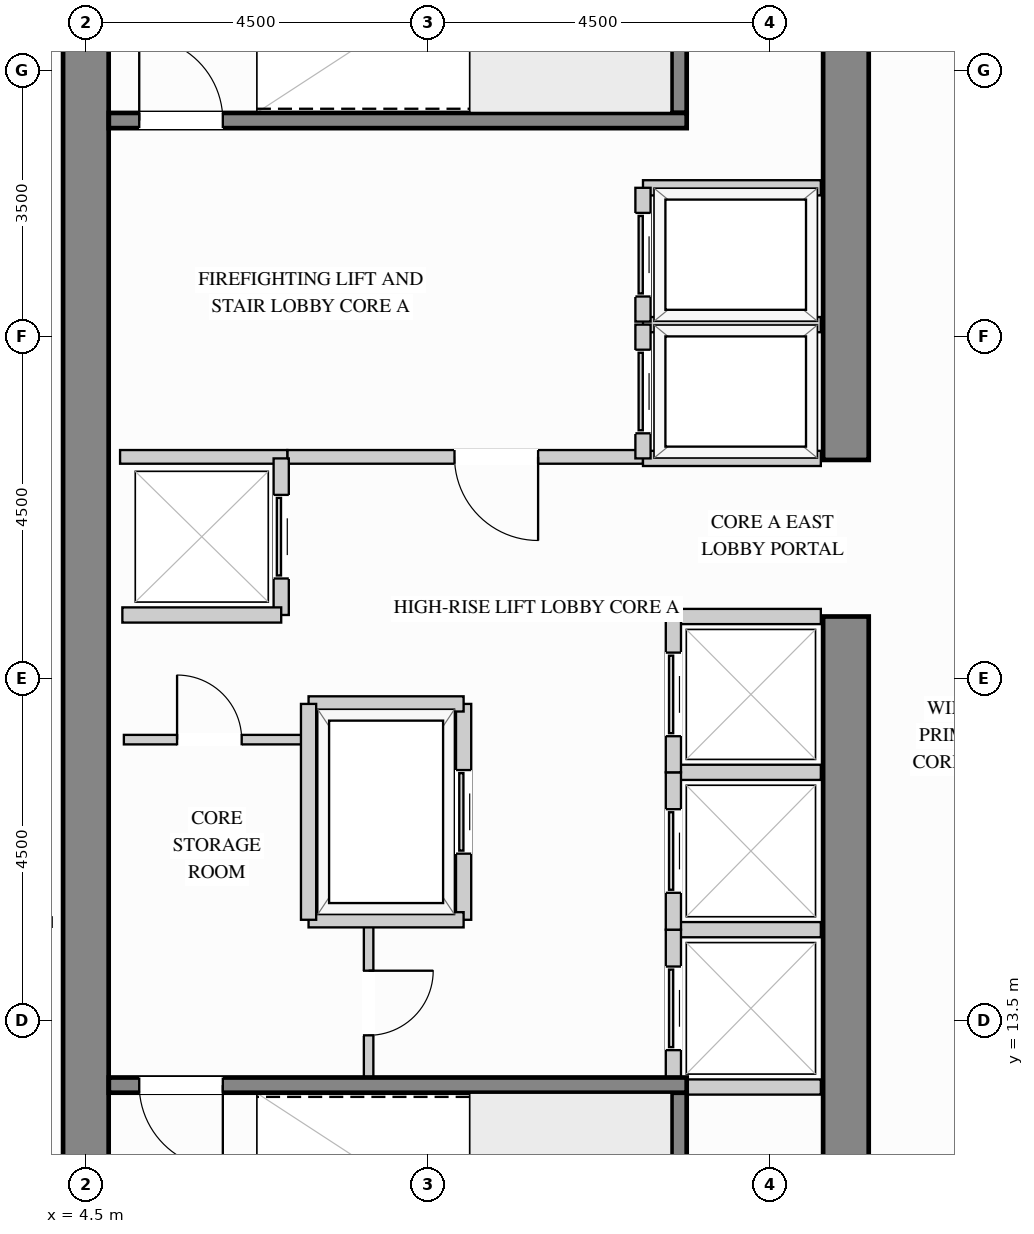
"""IFC4 building model, lengths in metres.
Left out: names, types, materials, properties, quantities, classifications, styles, units other than length and angle.
Written with IfcOpenShell. Run it as: python <this file> out.ifc"""

import sys

from ifc_helpers import new_model, si_unit, direction, frame, frame_2d, origin, place, context, subcontext, project, spatial, rectangle, extrude, source, transform, mapped, element, fill, save


model = new_model("IFC4")
c1 = context("Model", 3, precision=1e-05, world=origin(), true_north=direction((0.0, 1.0)))
c2 = subcontext(c1, "Body", "Model", "MODEL_VIEW")
j1 = project(units=[si_unit("LENGTHUNIT", "METRE"), si_unit("PLANEANGLEUNIT", "RADIAN")], contexts=[c1])
p1 = place(None, origin())
s1 = spatial("IfcSite", under=j1, at=p1, CompositionType="ELEMENT")
p2 = place(p1, origin())
s2 = spatial("IfcBuilding", under=s1, at=p2, CompositionType="ELEMENT")
p3 = place(p2, frame((0.0, 0.0, 150.3)))
s3 = spatial("IfcBuildingStorey", under=s2, at=p3, CompositionType="ELEMENT", Elevation=150.3)
m1 = source(origin(), c2, "Body", "SweptSolid", [
    extrude(rectangle(XDim=10.02, YDim=0.6, at=frame_2d((5.01, 0.0))), origin(), (0.0, 0.0, 1.0), 3.4),
])
p4 = place(p3, frame((14.5, 8.8, 0.0), z_axis=(0.0, 0.0, 1.0), x_axis=(0.0, 1.0, 0.0)))
e1 = element("IfcWall", 1, at=p4, inside=s3, PredefinedType="SHEAR", context=c2, shape_type="MappedRepresentation", body=[
    mapped(m1, transform((0.0, 0.0, 0.0), x_axis=(1.0, 0.0, 0.0), y_axis=(0.0, 1.0, 0.0), z_axis=(0.0, 0.0, 1.0))),
])
m2 = source(origin(), c2, "Body", "SweptSolid", [
    extrude(rectangle(XDim=8.32, YDim=0.6, at=frame_2d((4.16, 0.0))), origin(), (0.0, 0.0, 1.0), 3.4),
])
p5 = place(p3, frame((14.5, 20.88, 0.0), z_axis=(0.0, 0.0, 1.0), x_axis=(0.0, 1.0, 0.0)))
e2 = element("IfcWall", 2, at=p5, inside=s3, PredefinedType="SHEAR", context=c2, shape_type="MappedRepresentation", body=[
    mapped(m2, transform((0.0, 0.0, 0.0), x_axis=(1.0, 0.0, 0.0), y_axis=(0.0, 1.0, 0.0), z_axis=(0.0, 0.0, 1.0))),
])
m3 = source(origin(), c2, "Body", "SweptSolid", [
    extrude(rectangle(XDim=20.4, YDim=0.6, at=frame_2d((10.2, 0.0))), origin(), (0.0, 0.0, 1.0), 3.4),
])
p6 = place(p3, frame((4.5, 8.8, 0.0), z_axis=(0.0, 0.0, 1.0), x_axis=(0.0, 1.0, 0.0)))
e3 = element("IfcWall", 3, at=p6, inside=s3, PredefinedType="SHEAR", context=c2, shape_type="MappedRepresentation", body=[
    mapped(m3, transform((0.0, 0.0, 0.0), x_axis=(1.0, 0.0, 0.0), y_axis=(0.0, 1.0, 0.0), z_axis=(0.0, 0.0, 1.0))),
])
p7 = place(p3, frame((7.15, 20.92, 0.0), z_axis=(0.0, 0.0, 1.0), x_axis=(1.0, 0.0, 0.0)))
e4 = element("IfcWall", 4, at=p7, inside=s3, PredefinedType="PARTITIONING", context=c2, shape_type="SweptSolid", body=[
    extrude(rectangle(XDim=4.68, YDim=0.18, at=frame_2d((2.34, 0.0))), origin(), (0.0, 0.0, 1.0), 3.385),
])
p8 = place(p7, frame((2.2, 0.0, 0.0)))
e5 = element("IfcOpeningElement", 5, at=p8, cuts=e4, PredefinedType="OPENING", context=c2, shape_type="SweptSolid", body=[
    extrude(rectangle(XDim=1.1, YDim=2.15, at=frame_2d((0.55, 1.075))), frame((0.0, 0.1, 0.0), z_axis=(0.0, -1.0, 0.0), x_axis=(1.0, 0.0, 0.0)), (0.0, 0.0, 1.0), 0.2),
])
m4 = source(origin(), c2, "Body", "SweptSolid", [
    extrude(rectangle(XDim=2.2, YDim=0.18, at=frame_2d((1.1, 0.0))), origin(), (0.0, 0.0, 1.0), 3.385),
])
p9 = place(p3, frame((4.95, 20.92, 0.0), z_axis=(0.0, 0.0, 1.0), x_axis=(1.0, 0.0, 0.0)))
e6 = element("IfcWall", 6, at=p9, inside=s3, PredefinedType="PARTITIONING", context=c2, shape_type="MappedRepresentation", body=[
    mapped(m4, transform((0.0, 0.0, 0.0), x_axis=(1.0, 0.0, 0.0), y_axis=(0.0, 1.0, 0.0), z_axis=(0.0, 0.0, 1.0))),
])
p10 = place(p3, frame((8.22, 12.75, 0.0), z_axis=(0.0, 0.0, 1.0), x_axis=(0.0, 1.0, 0.0)))
e7 = element("IfcWall", 7, at=p10, inside=s3, PredefinedType="PARTITIONING", context=c2, shape_type="SweptSolid", body=[
    extrude(rectangle(XDim=2.07, YDim=0.125, at=frame_2d((1.035, 0.0))), origin(), (0.0, 0.0, 1.0), 3.385),
])
p11 = place(p10, frame((0.56, 0.0, 0.0)))
e8 = element("IfcOpeningElement", 8, at=p11, cuts=e7, PredefinedType="OPENING", context=c2, shape_type="SweptSolid", body=[
    extrude(rectangle(XDim=0.85, YDim=2.1, at=frame_2d((0.425, 1.05))), frame((0.0, 0.073, 0.0), z_axis=(0.0, -1.0, 0.0), x_axis=(1.0, 0.0, 0.0)), (0.0, 0.0, 1.0), 0.145),
])
p12 = place(p3, frame((5.0, 17.2, 0.0), z_axis=(0.0, 0.0, 1.0), x_axis=(1.0, 0.0, 0.0)))
e9 = element("IfcWall", 9, at=p12, inside=s3, PredefinedType="PARTITIONING", context=c2, shape_type="SweptSolid", body=[
    extrude(rectangle(XDim=2.4, YDim=0.125, at=frame_2d((1.2, 0.0))), origin(), (0.0, 0.0, 1.0), 3.385),
])
p13 = place(p12, frame((0.7, 0.0, 0.0)))
e10 = element("IfcOpeningElement", 10, at=p13, cuts=e9, PredefinedType="OPENING", context=c2, shape_type="SweptSolid", body=[
    extrude(rectangle(XDim=0.85, YDim=2.1, at=frame_2d((0.425, 1.05))), frame((0.0, 0.073, 0.0), z_axis=(0.0, -1.0, 0.0), x_axis=(1.0, 0.0, 0.0)), (0.0, 0.0, 1.0), 0.145),
])
m5 = source(origin(), c2, "Body", "SweptSolid", [
    extrude(rectangle(XDim=3.698, YDim=0.125, at=frame_2d((1.849, 0.0))), origin(), (0.0, 0.0, 1.0), 3.385),
])
p14 = place(p3, frame((0.352, 14.8, 0.0), z_axis=(0.0, 0.0, 1.0), x_axis=(1.0, 0.0, 0.0)))
e11 = element("IfcWall", 11, at=p14, inside=s3, PredefinedType="PARTITIONING", context=c2, shape_type="MappedRepresentation", body=[
    mapped(m5, transform((0.0, 0.0, 0.0), x_axis=(1.0, 0.0, 0.0), y_axis=(0.0, 1.0, 0.0), z_axis=(0.0, 0.0, 1.0))),
])
m6 = source(origin(), c2, "Body", "SweptSolid", [
    extrude(rectangle(XDim=2.34, YDim=0.2, at=frame_2d((1.17, 0.0))), origin(), (0.0, 0.0, 1.0), 3.385),
])
for number, where, z_axis, x_axis in (
    (12, (11.83, 22.66, 0.0), (0.0, 0.0, 1.0), (1.0, 0.0, 0.0)),
    (13, (11.83, 20.9, 0.0), (0.0, 0.0, 1.0), (1.0, 0.0, 0.0)),
):
    element("IfcWall", number, at=place(p3, frame(where, z_axis=z_axis, x_axis=x_axis)), inside=s3, PredefinedType="PARTITIONING", context=c2, shape_type="MappedRepresentation", body=[
        mapped(m6, transform((0.0, 0.0, 0.0), x_axis=(1.0, 0.0, 0.0), y_axis=(0.0, 1.0, 0.0), z_axis=(0.0, 0.0, 1.0))),
    ])
p15 = place(p3, frame((11.83, 20.9, 0.0), z_axis=(0.0, 0.0, 1.0), x_axis=(0.0, 1.0, 0.0)))
e14 = element("IfcWall", 14, at=p15, inside=s3, PredefinedType="PARTITIONING", context=c2, shape_type="SweptSolid", body=[
    extrude(rectangle(XDim=1.76, YDim=0.2, at=frame_2d((0.88, 0.0))), origin(), (0.0, 0.0, 1.0), 3.385),
])
p16 = place(p15, frame((0.33, 0.0, 0.0)))
e15 = element("IfcOpeningElement", 15, at=p16, cuts=e14, PredefinedType="OPENING", context=c2, shape_type="SweptSolid", body=[
    extrude(rectangle(XDim=1.1, YDim=2.2, at=frame_2d((0.55, 1.1))), frame((0.0, 0.11, 0.0), z_axis=(0.0, -1.0, 0.0), x_axis=(1.0, 0.0, 0.0)), (0.0, 0.0, 1.0), 0.22),
])
p17 = place(p3, frame((11.83, 24.46, 0.0), z_axis=(0.0, 0.0, 1.0), x_axis=(1.0, 0.0, 0.0)))
e16 = element("IfcWall", 16, at=p17, inside=s3, PredefinedType="PARTITIONING", context=c2, shape_type="MappedRepresentation", body=[
    mapped(m6, transform((0.0, 0.0, 0.0), x_axis=(1.0, 0.0, 0.0), y_axis=(0.0, 1.0, 0.0), z_axis=(0.0, 0.0, 1.0))),
])
p18 = place(p3, frame((11.83, 22.7, 0.0), z_axis=(0.0, 0.0, 1.0), x_axis=(0.0, 1.0, 0.0)))
e17 = element("IfcWall", 17, at=p18, inside=s3, PredefinedType="PARTITIONING", context=c2, shape_type="SweptSolid", body=[
    extrude(rectangle(XDim=1.76, YDim=0.2, at=frame_2d((0.88, 0.0))), origin(), (0.0, 0.0, 1.0), 3.385),
])
p19 = place(p18, frame((0.33, 0.0, 0.0)))
e18 = element("IfcOpeningElement", 18, at=p19, cuts=e17, PredefinedType="OPENING", context=c2, shape_type="SweptSolid", body=[
    extrude(rectangle(XDim=1.1, YDim=2.2, at=frame_2d((0.55, 1.1))), frame((0.0, 0.11, 0.0), z_axis=(0.0, -1.0, 0.0), x_axis=(1.0, 0.0, 0.0)), (0.0, 0.0, 1.0), 0.22),
])
m7 = source(origin(), c2, "Body", "SweptSolid", [
    extrude(rectangle(XDim=1.94, YDim=0.2, at=frame_2d((0.97, 0.0))), origin(), (0.0, 0.0, 1.0), 3.385),
])
for number, where, z_axis, x_axis in (
    (19, (12.23, 14.7, 0.0), (0.0, 0.0, 1.0), (1.0, 0.0, 0.0)),
    (20, (12.23, 12.63, 0.0), (0.0, 0.0, 1.0), (1.0, 0.0, 0.0)),
):
    element("IfcWall", number, at=place(p3, frame(where, z_axis=z_axis, x_axis=x_axis)), inside=s3, PredefinedType="PARTITIONING", context=c2, shape_type="MappedRepresentation", body=[
        mapped(m7, transform((0.0, 0.0, 0.0), x_axis=(1.0, 0.0, 0.0), y_axis=(0.0, 1.0, 0.0), z_axis=(0.0, 0.0, 1.0))),
    ])
p20 = place(p3, frame((12.23, 12.63, 0.0), z_axis=(0.0, 0.0, 1.0), x_axis=(0.0, 1.0, 0.0)))
e21 = element("IfcWall", 21, at=p20, inside=s3, PredefinedType="PARTITIONING", context=c2, shape_type="SweptSolid", body=[
    extrude(rectangle(XDim=2.07, YDim=0.2, at=frame_2d((1.035, 0.0))), origin(), (0.0, 0.0, 1.0), 3.385),
])
p21 = place(p20, frame((0.485, 0.0, 0.0)))
e22 = element("IfcOpeningElement", 22, at=p21, cuts=e21, PredefinedType="OPENING", context=c2, shape_type="SweptSolid", body=[
    extrude(rectangle(XDim=1.1, YDim=2.2, at=frame_2d((0.55, 1.1))), frame((0.0, 0.11, 0.0), z_axis=(0.0, -1.0, 0.0), x_axis=(1.0, 0.0, 0.0)), (0.0, 0.0, 1.0), 0.22),
])
p22 = place(p3, frame((12.23, 16.77, 0.0), z_axis=(0.0, 0.0, 1.0), x_axis=(1.0, 0.0, 0.0)))
e23 = element("IfcWall", 23, at=p22, inside=s3, PredefinedType="PARTITIONING", context=c2, shape_type="MappedRepresentation", body=[
    mapped(m7, transform((0.0, 0.0, 0.0), x_axis=(1.0, 0.0, 0.0), y_axis=(0.0, 1.0, 0.0), z_axis=(0.0, 0.0, 1.0))),
])
p23 = place(p3, frame((12.23, 14.7, 0.0), z_axis=(0.0, 0.0, 1.0), x_axis=(0.0, 1.0, 0.0)))
e24 = element("IfcWall", 24, at=p23, inside=s3, PredefinedType="PARTITIONING", context=c2, shape_type="SweptSolid", body=[
    extrude(rectangle(XDim=2.07, YDim=0.2, at=frame_2d((1.035, 0.0))), origin(), (0.0, 0.0, 1.0), 3.385),
])
p24 = place(p23, frame((0.485, 0.0, 0.0)))
e25 = element("IfcOpeningElement", 25, at=p24, cuts=e24, PredefinedType="OPENING", context=c2, shape_type="SweptSolid", body=[
    extrude(rectangle(XDim=1.1, YDim=2.2, at=frame_2d((0.55, 1.1))), frame((0.0, 0.11, 0.0), z_axis=(0.0, -1.0, 0.0), x_axis=(1.0, 0.0, 0.0)), (0.0, 0.0, 1.0), 0.22),
])
p25 = place(p3, frame((12.23, 18.82, 0.0), z_axis=(0.0, 0.0, 1.0), x_axis=(1.0, 0.0, 0.0)))
e26 = element("IfcWall", 26, at=p25, inside=s3, PredefinedType="PARTITIONING", context=c2, shape_type="MappedRepresentation", body=[
    mapped(m7, transform((0.0, 0.0, 0.0), x_axis=(1.0, 0.0, 0.0), y_axis=(0.0, 1.0, 0.0), z_axis=(0.0, 0.0, 1.0))),
])
p26 = place(p3, frame((12.23, 16.77, 0.0), z_axis=(0.0, 0.0, 1.0), x_axis=(0.0, 1.0, 0.0)))
e27 = element("IfcWall", 27, at=p26, inside=s3, PredefinedType="PARTITIONING", context=c2, shape_type="SweptSolid", body=[
    extrude(rectangle(XDim=2.05, YDim=0.2, at=frame_2d((1.025, 0.0))), origin(), (0.0, 0.0, 1.0), 3.385),
])
p27 = place(p26, frame((0.475, 0.0, 0.0)))
e28 = element("IfcOpeningElement", 28, at=p27, cuts=e27, PredefinedType="OPENING", context=c2, shape_type="SweptSolid", body=[
    extrude(rectangle(XDim=1.1, YDim=2.2, at=frame_2d((0.55, 1.1))), frame((0.0, 0.11, 0.0), z_axis=(0.0, -1.0, 0.0), x_axis=(1.0, 0.0, 0.0)), (0.0, 0.0, 1.0), 0.22),
])
p28 = place(p3, frame((7.07, 18.84, 0.0), z_axis=(0.0, 0.0, 1.0), x_axis=(0.0, 1.0, 0.0)))
e29 = element("IfcWall", 29, at=p28, inside=s3, PredefinedType="PARTITIONING", context=c2, shape_type="SweptSolid", body=[
    extrude(rectangle(XDim=2.06, YDim=0.2, at=frame_2d((1.03, 0.0))), origin(), (0.0, 0.0, 1.0), 3.385),
])
p29 = place(p28, frame((0.48, 0.0, 0.0)))
e30 = element("IfcOpeningElement", 30, at=p29, cuts=e29, PredefinedType="OPENING", context=c2, shape_type="SweptSolid", body=[
    extrude(rectangle(XDim=1.1, YDim=2.2, at=frame_2d((0.55, 1.1))), frame((0.0, 0.11, 0.0), z_axis=(0.0, -1.0, 0.0), x_axis=(1.0, 0.0, 0.0)), (0.0, 0.0, 1.0), 0.22),
])
m8 = source(origin(), c2, "Body", "SweptSolid", [
    extrude(rectangle(XDim=2.09, YDim=0.2, at=frame_2d((1.045, 0.0))), origin(), (0.0, 0.0, 1.0), 3.385),
])
p30 = place(p3, frame((4.98, 18.84, 0.0), z_axis=(0.0, 0.0, 1.0), x_axis=(1.0, 0.0, 0.0)))
e31 = element("IfcWall", 31, at=p30, inside=s3, PredefinedType="PARTITIONING", context=c2, shape_type="MappedRepresentation", body=[
    mapped(m8, transform((0.0, 0.0, 0.0), x_axis=(1.0, 0.0, 0.0), y_axis=(0.0, 1.0, 0.0), z_axis=(0.0, 0.0, 1.0))),
])
p31 = place(p3, frame((9.47, 14.83, 0.0), z_axis=(0.0, 0.0, 1.0), x_axis=(0.0, 1.0, 0.0)))
e32 = element("IfcWall", 32, at=p31, inside=s3, PredefinedType="PARTITIONING", context=c2, shape_type="SweptSolid", body=[
    extrude(rectangle(XDim=2.84, YDim=0.2, at=frame_2d((1.42, 0.0))), origin(), (0.0, 0.0, 1.0), 3.385),
])
p32 = place(p31, frame((0.87, 0.0, 0.0)))
e33 = element("IfcOpeningElement", 33, at=p32, cuts=e32, PredefinedType="OPENING", context=c2, shape_type="SweptSolid", body=[
    extrude(rectangle(XDim=1.1, YDim=2.2, at=frame_2d((0.55, 1.1))), frame((0.0, 0.11, 0.0), z_axis=(0.0, -1.0, 0.0), x_axis=(1.0, 0.0, 0.0)), (0.0, 0.0, 1.0), 0.22),
])
m9 = source(origin(), c2, "Body", "SweptSolid", [
    extrude(rectangle(XDim=2.04, YDim=0.2, at=frame_2d((1.02, 0.0))), origin(), (0.0, 0.0, 1.0), 3.385),
])
for number, where, z_axis, x_axis in (
    (34, (7.43, 17.67, 0.0), (0.0, 0.0, 1.0), (1.0, 0.0, 0.0)),
    (35, (7.43, 14.83, 0.0), (0.0, 0.0, 1.0), (1.0, 0.0, 0.0)),
):
    element("IfcWall", number, at=place(p3, frame(where, z_axis=z_axis, x_axis=x_axis)), inside=s3, PredefinedType="PARTITIONING", context=c2, shape_type="MappedRepresentation", body=[
        mapped(m9, transform((0.0, 0.0, 0.0), x_axis=(1.0, 0.0, 0.0), y_axis=(0.0, 1.0, 0.0), z_axis=(0.0, 0.0, 1.0))),
    ])
m10 = source(origin(), c2, "Body", "SweptSolid", [
    extrude(rectangle(XDim=2.84, YDim=0.2, at=frame_2d((1.42, 0.0))), origin(), (0.0, 0.0, 1.0), 3.385),
])
p33 = place(p3, frame((7.43, 14.83, 0.0), z_axis=(0.0, 0.0, 1.0), x_axis=(0.0, 1.0, 0.0)))
e36 = element("IfcWall", 36, at=p33, inside=s3, PredefinedType="PARTITIONING", context=c2, shape_type="MappedRepresentation", body=[
    mapped(m10, transform((0.0, 0.0, 0.0), x_axis=(1.0, 0.0, 0.0), y_axis=(0.0, 1.0, 0.0), z_axis=(0.0, 0.0, 1.0))),
])
m11 = source(origin(), c2, "Body", "SweptSolid", [
    extrude(rectangle(XDim=3.753, YDim=0.2, at=frame_2d((1.876, 0.0))), origin(), (0.0, 0.0, 1.0), 3.4),
])
p34 = place(p3, frame((12.305, 8.802, 0.0), z_axis=(0.0, 0.0, 1.0), x_axis=(0.0, 1.0, 0.0)))
e37 = element("IfcWall", 37, at=p34, inside=s3, PredefinedType="SHEAR", context=c2, shape_type="MappedRepresentation", body=[
    mapped(m11, transform((0.0, 0.0, 0.0), x_axis=(1.0, 0.0, 0.0), y_axis=(0.0, 1.0, 0.0), z_axis=(0.0, 0.0, 1.0))),
])
p35 = place(p3, frame((4.802, 12.655, 0.0), z_axis=(0.0, 0.0, 1.0), x_axis=(1.0, 0.0, 0.0)))
e38 = element("IfcWall", 38, at=p35, inside=s3, PredefinedType="SHEAR", context=c2, shape_type="SweptSolid", body=[
    extrude(rectangle(XDim=7.603, YDim=0.2, at=frame_2d((3.802, 0.0))), origin(), (0.0, 0.0, 1.0), 3.4),
])
p36 = place(p35, frame((0.4, 0.0, 0.0)))
e39 = element("IfcOpeningElement", 39, at=p36, cuts=e38, PredefinedType="OPENING", context=c2, shape_type="SweptSolid", body=[
    extrude(rectangle(XDim=1.1, YDim=2.15, at=frame_2d((0.55, 1.075))), frame((0.0, 0.11, 0.0), z_axis=(0.0, -1.0, 0.0), x_axis=(1.0, 0.0, 0.0)), (0.0, 0.0, 1.0), 0.22),
])
p37 = place(p3, frame((12.305, 25.445, 0.0), z_axis=(0.0, 0.0, 1.0), x_axis=(0.0, 1.0, 0.0)))
e40 = element("IfcWall", 40, at=p37, inside=s3, PredefinedType="SHEAR", context=c2, shape_type="MappedRepresentation", body=[
    mapped(m11, transform((0.0, 0.0, 0.0), x_axis=(1.0, 0.0, 0.0), y_axis=(0.0, 1.0, 0.0), z_axis=(0.0, 0.0, 1.0))),
])
p38 = place(p3, frame((4.802, 25.345, 0.0), z_axis=(0.0, 0.0, 1.0), x_axis=(1.0, 0.0, 0.0)))
e41 = element("IfcWall", 41, at=p38, inside=s3, PredefinedType="SHEAR", context=c2, shape_type="SweptSolid", body=[
    extrude(rectangle(XDim=7.603, YDim=0.2, at=frame_2d((3.802, 0.0))), origin(), (0.0, 0.0, 1.0), 3.4),
])
p39 = place(p38, frame((0.4, 0.0, 0.0)))
e42 = element("IfcOpeningElement", 42, at=p39, cuts=e41, PredefinedType="OPENING", context=c2, shape_type="SweptSolid", body=[
    extrude(rectangle(XDim=1.1, YDim=2.15, at=frame_2d((0.55, 1.075))), frame((0.0, 0.11, 0.0), z_axis=(0.0, -1.0, 0.0), x_axis=(1.0, 0.0, 0.0)), (0.0, 0.0, 1.0), 0.22),
])
m12 = source(origin(), c2, "Body", "SweptSolid", [
    extrude(rectangle(XDim=1.1, YDim=2.15, at=frame_2d((0.55, 1.075))), frame((0.0, 0.025, 0.0), z_axis=(0.0, -1.0, 0.0), x_axis=(1.0, 0.0, 0.0)), (0.0, 0.0, 1.0), 0.05),
])
p40 = place(p8, origin())
e43 = element("IfcDoor", 43, at=p40, inside=s3, OperationType="SINGLE_SWING_RIGHT", PredefinedType="DOOR", context=c2, shape_type="MappedRepresentation", body=[
    mapped(m12, transform((0.0, 0.0, 0.0), x_axis=(1.0, 0.0, 0.0), y_axis=(0.0, 1.0, 0.0), z_axis=(0.0, 0.0, 1.0))),
])
fill(e5, e43)
m13 = source(origin(), c2, "Body", "SweptSolid", [
    extrude(rectangle(XDim=1.1, YDim=2.2, at=frame_2d((0.55, 1.1))), frame((0.0, 0.025, 0.0), z_axis=(0.0, -1.0, 0.0), x_axis=(1.0, 0.0, 0.0)), (0.0, 0.0, 1.0), 0.05),
])
p41 = place(p16, origin())
e44 = element("IfcDoor", 44, at=p41, inside=s3, OperationType="SLIDING_TO_LEFT", PredefinedType="DOOR", context=c2, shape_type="MappedRepresentation", body=[
    mapped(m13, transform((0.0, 0.0, 0.0), x_axis=(1.0, 0.0, 0.0), y_axis=(0.0, 1.0, 0.0), z_axis=(0.0, 0.0, 1.0))),
])
fill(e15, e44)
p42 = place(p19, origin())
e45 = element("IfcDoor", 45, at=p42, inside=s3, OperationType="SLIDING_TO_LEFT", PredefinedType="DOOR", context=c2, shape_type="MappedRepresentation", body=[
    mapped(m13, transform((0.0, 0.0, 0.0), x_axis=(1.0, 0.0, 0.0), y_axis=(0.0, 1.0, 0.0), z_axis=(0.0, 0.0, 1.0))),
])
fill(e18, e45)
p43 = place(p21, origin())
e46 = element("IfcDoor", 46, at=p43, inside=s3, OperationType="SLIDING_TO_LEFT", PredefinedType="DOOR", context=c2, shape_type="MappedRepresentation", body=[
    mapped(m13, transform((0.0, 0.0, 0.0), x_axis=(1.0, 0.0, 0.0), y_axis=(0.0, 1.0, 0.0), z_axis=(0.0, 0.0, 1.0))),
])
fill(e22, e46)
p44 = place(p24, origin())
e47 = element("IfcDoor", 47, at=p44, inside=s3, OperationType="SLIDING_TO_LEFT", PredefinedType="DOOR", context=c2, shape_type="MappedRepresentation", body=[
    mapped(m13, transform((0.0, 0.0, 0.0), x_axis=(1.0, 0.0, 0.0), y_axis=(0.0, 1.0, 0.0), z_axis=(0.0, 0.0, 1.0))),
])
fill(e25, e47)
p45 = place(p27, origin())
e48 = element("IfcDoor", 48, at=p45, inside=s3, OperationType="SLIDING_TO_LEFT", PredefinedType="DOOR", context=c2, shape_type="MappedRepresentation", body=[
    mapped(m13, transform((0.0, 0.0, 0.0), x_axis=(1.0, 0.0, 0.0), y_axis=(0.0, 1.0, 0.0), z_axis=(0.0, 0.0, 1.0))),
])
fill(e28, e48)
p46 = place(p29, origin())
e49 = element("IfcDoor", 49, at=p46, inside=s3, OperationType="SLIDING_TO_LEFT", PredefinedType="DOOR", context=c2, shape_type="MappedRepresentation", body=[
    mapped(m13, transform((0.0, 0.0, 0.0), x_axis=(1.0, 0.0, 0.0), y_axis=(0.0, 1.0, 0.0), z_axis=(0.0, 0.0, 1.0))),
])
fill(e30, e49)
p47 = place(p32, origin())
e50 = element("IfcDoor", 50, at=p47, inside=s3, OperationType="SLIDING_TO_LEFT", PredefinedType="DOOR", context=c2, shape_type="MappedRepresentation", body=[
    mapped(m13, transform((0.0, 0.0, 0.0), x_axis=(1.0, 0.0, 0.0), y_axis=(0.0, 1.0, 0.0), z_axis=(0.0, 0.0, 1.0))),
])
fill(e33, e50)
m14 = source(origin(), c2, "Body", "SweptSolid", [
    extrude(rectangle(XDim=0.85, YDim=2.1, at=frame_2d((0.425, 1.05))), frame((0.0, 0.025, 0.0), z_axis=(0.0, -1.0, 0.0), x_axis=(1.0, 0.0, 0.0)), (0.0, 0.0, 1.0), 0.05),
])
p48 = place(p13, origin())
e51 = element("IfcDoor", 51, at=p48, inside=s3, OperationType="SINGLE_SWING_LEFT", PredefinedType="DOOR", context=c2, shape_type="MappedRepresentation", body=[
    mapped(m14, transform((0.0, 0.0, 0.0), x_axis=(1.0, 0.0, 0.0), y_axis=(0.0, 1.0, 0.0), z_axis=(0.0, 0.0, 1.0))),
])
fill(e10, e51)
p49 = place(p11, origin())
e52 = element("IfcDoor", 52, at=p49, inside=s3, OperationType="SINGLE_SWING_RIGHT", PredefinedType="DOOR", context=c2, shape_type="MappedRepresentation", body=[
    mapped(m14, transform((0.0, 0.0, 0.0), x_axis=(1.0, 0.0, 0.0), y_axis=(0.0, 1.0, 0.0), z_axis=(0.0, 0.0, 1.0))),
])
fill(e8, e52)
m15 = source(origin(), c2, "Body", "SweptSolid", [
    extrude(rectangle(XDim=1.1, YDim=2.15, at=frame_2d((0.55, 1.075))), frame((0.0, 0.025, 0.0), z_axis=(0.0, -1.0, 0.0), x_axis=(1.0, 0.0, 0.0)), (0.0, 0.0, 1.0), 0.05),
])
p50 = place(p36, origin())
e53 = element("IfcDoor", 53, at=p50, inside=s3, OperationType="SINGLE_SWING_RIGHT", PredefinedType="DOOR", context=c2, shape_type="MappedRepresentation", body=[
    mapped(m15, transform((0.0, 0.0, 0.0), x_axis=(1.0, 0.0, 0.0), y_axis=(0.0, 1.0, 0.0), z_axis=(0.0, 0.0, 1.0))),
])
fill(e39, e53)
p51 = place(p39, origin())
e54 = element("IfcDoor", 54, at=p51, inside=s3, OperationType="SINGLE_SWING_LEFT", PredefinedType="DOOR", context=c2, shape_type="MappedRepresentation", body=[
    mapped(m15, transform((0.0, 0.0, 0.0), x_axis=(1.0, 0.0, 0.0), y_axis=(0.0, 1.0, 0.0), z_axis=(0.0, 0.0, 1.0))),
])
fill(e42, e54)
save(model, sys.argv[1])
